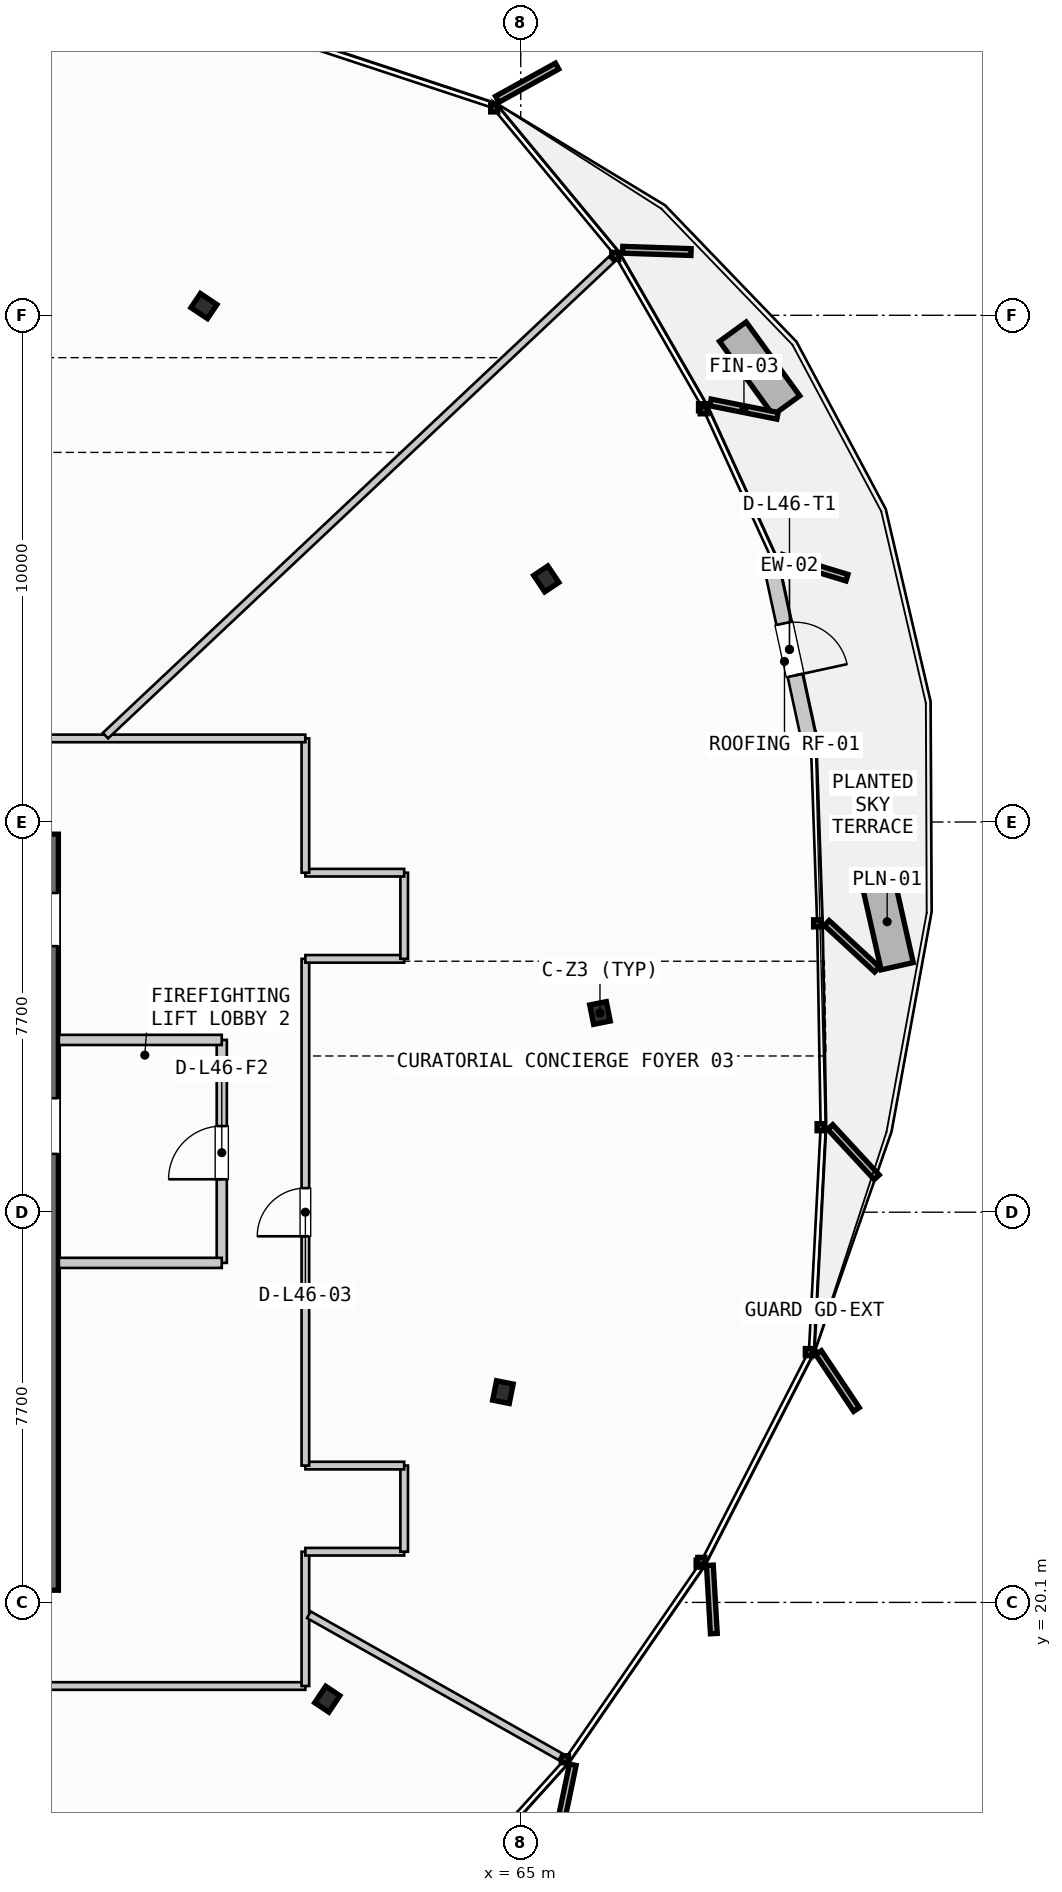
"""IFC4 building model, lengths in metres.
Left out: names, types, materials, properties, quantities, classifications, styles, units other than length and angle.
Written with IfcOpenShell. Run it as: python <this file> out.ifc"""

import sys

from ifc_helpers import new_model, si_unit, direction, frame, frame_2d, origin, origin_2d, place, context, subcontext, project, spatial, rectangle, i_section, extrude, source, transform, mapped, element, fill, save


model = new_model("IFC4")
c1 = context("Model", 3, precision=1e-05, world=origin(), true_north=direction((0.0, 1.0)))
c2 = subcontext(c1, "Body", "Model", "MODEL_VIEW")
j1 = project(units=[si_unit("LENGTHUNIT", "METRE"), si_unit("PLANEANGLEUNIT", "RADIAN")], contexts=[c1])
p1 = place(None, origin())
s1 = spatial("IfcSite", under=j1, at=p1, CompositionType="ELEMENT")
p2 = place(p1, origin())
s2 = spatial("IfcBuilding", under=s1, at=p2, CompositionType="ELEMENT")
p3 = place(p2, frame((0.0, 0.0, 179.9)))
s3 = spatial("IfcBuildingStorey", under=s2, at=p3, CompositionType="ELEMENT", Elevation=179.9)
p4 = place(p3, frame((55.6, 20.34, 0.0), z_axis=(0.0, 0.0, 1.0), x_axis=(0.0, 1.0, 0.0)))
e1 = element("IfcWall", 1, at=p4, inside=s3, PredefinedType="SHEAR", context=c2, shape_type="SweptSolid", body=[
    extrude(rectangle(XDim=14.92, YDim=0.55, at=frame_2d((7.46, 0.0))), origin(), (0.0, 0.0, 1.0), 3.26),
])
p5 = place(p4, frame((12.71, 0.0, 0.0)))
e2 = element("IfcOpeningElement", 2, at=p5, cuts=e1, PredefinedType="OPENING", context=c2, shape_type="SweptSolid", body=[
    extrude(rectangle(XDim=1.05, YDim=2.15, at=frame_2d((0.525, 1.075))), frame((0.0, 0.285, 0.0), z_axis=(0.0, -1.0, 0.0), x_axis=(1.0, 0.0, 0.0)), (0.0, 0.0, 1.0), 0.57),
])
p6 = place(p4, frame((8.61, 0.0, 0.0)))
e3 = element("IfcOpeningElement", 3, at=p6, cuts=e1, PredefinedType="OPENING", context=c2, shape_type="SweptSolid", body=[
    extrude(rectangle(XDim=1.1, YDim=2.2, at=frame_2d((0.55, 1.1))), frame((0.0, 0.285, 0.0), z_axis=(0.0, -1.0, 0.0), x_axis=(1.0, 0.0, 0.0)), (0.0, 0.0, 1.0), 0.57),
])
m1 = source(origin(), c2, "Body", "SweptSolid", [
    extrude(i_section(OverallWidth=0.391, OverallDepth=0.335, WebThickness=0.023, FlangeThickness=0.034, FilletRadius=0.015, at=origin_2d()), origin(), (0.0, 0.0, 1.0), 3.26),
])
for number, where, z_axis, x_axis in (
    (4, (66.564, 31.731, 0.0), (0.0, 0.0, 1.0), (0.981, 0.195, 0.0)),
    (5, (65.504, 40.298, 0.0), (0.0, 0.0, 1.0), (0.831, 0.556, 0.0)),
    (6, (58.748, 45.681, 0.0), (0.0, 0.0, 1.0), (0.556, 0.831, 0.0)),
    (7, (61.183, 18.19, 0.0), (0.0, 0.0, 1.0), (0.831, -0.556, 0.0)),
    (8, (64.649, 24.25, 0.0), (0.0, 0.0, 1.0), (0.981, -0.195, 0.0)),
):
    element("IfcColumn", number, at=place(p3, frame(where, z_axis=z_axis, x_axis=x_axis)), inside=s3, PredefinedType="COLUMN", context=c2, shape_type="MappedRepresentation", body=[
        mapped(m1, transform((0.0, 0.0, 0.0), scale=1.0)),
    ])
p7 = place(p3, frame((69.935, 40.613, 0.0), z_axis=(0.0, 0.0, 1.0), x_axis=(0.211576423472, -0.977361456694, 0.0)))
e9 = element("IfcWall", 9, at=p7, inside=s3, PredefinedType="SOLIDWALL", context=c2, shape_type="SweptSolid", body=[
    extrude(rectangle(XDim=3.493, YDim=0.3, at=frame_2d((1.747, 0.0))), origin(), (0.0, 0.0, 1.0), 2.735),
])
p8 = place(p7, frame((1.221, 0.0, 0.0)))
e10 = element("IfcOpeningElement", 10, at=p8, cuts=e9, PredefinedType="OPENING", context=c2, shape_type="SweptSolid", body=[
    extrude(rectangle(XDim=1.05, YDim=2.2, at=frame_2d((0.525, 1.1))), frame((0.0, 0.16, 0.0), z_axis=(0.0, -1.0, 0.0), x_axis=(1.0, 0.0, 0.0)), (0.0, 0.0, 1.0), 0.32),
])
p9 = place(p3, frame((59.1, 26.8, 0.0), z_axis=(0.0, 0.0, 1.0), x_axis=(0.0, 1.0, 0.0)))
e11 = element("IfcWall", 11, at=p9, inside=s3, PredefinedType="PARTITIONING", context=c2, shape_type="SweptSolid", body=[
    extrude(rectangle(XDim=4.4, YDim=0.2, at=frame_2d((2.2, 0.0))), origin(), (0.0, 0.0, 1.0), 2.28),
])
p10 = place(p9, frame((1.65, 0.0, 0.0)))
e12 = element("IfcOpeningElement", 12, at=p10, cuts=e11, PredefinedType="OPENING", context=c2, shape_type="SweptSolid", body=[
    extrude(rectangle(XDim=1.05, YDim=2.15, at=frame_2d((0.525, 1.075))), frame((0.0, 0.11, 0.0), z_axis=(0.0, -1.0, 0.0), x_axis=(1.0, 0.0, 0.0)), (0.0, 0.0, 1.0), 0.22),
])
for number, where, z_axis, x_axis in (
    (13, (55.885, 26.8, 0.0), (0.0, 0.0, 1.0), (1.0, 0.0, 0.0)),
    (14, (55.885, 31.2, 0.0), (0.0, 0.0, 1.0), (1.0, 0.0, 0.0)),
):
    element("IfcWall", number, at=place(p3, frame(where, z_axis=z_axis, x_axis=x_axis)), inside=s3, PredefinedType="PARTITIONING", context=c2, shape_type="SweptSolid", body=[
        extrude(rectangle(XDim=3.215, YDim=0.2, at=frame_2d((1.607, 0.0))), origin(), (0.0, 0.0, 1.0), 2.28),
    ])
p11 = place(p3, frame((32.4, 18.45, 0.0), z_axis=(0.0, 0.0, 1.0), x_axis=(1.0, 0.0, 0.0)))
e15 = element("IfcWall", 15, at=p11, inside=s3, PredefinedType="PARTITIONING", context=c2, shape_type="SweptSolid", body=[
    extrude(rectangle(XDim=28.35, YDim=0.15, at=frame_2d((14.175, 0.0))), origin(), (0.0, 0.0, 1.0), 2.28),
])
p12 = place(p11, frame((5.362, 0.0, 0.0)))
e16 = element("IfcOpeningElement", 16, at=p12, cuts=e15, PredefinedType="OPENING", context=c2, shape_type="SweptSolid", body=[
    extrude(rectangle(XDim=0.95, YDim=2.15, at=frame_2d((0.475, 1.075))), frame((0.0, 0.085, 0.0), z_axis=(0.0, -1.0, 0.0), x_axis=(1.0, 0.0, 0.0)), (0.0, 0.0, 1.0), 0.17),
])
p13 = place(p11, frame((18.948, 0.0, 0.0)))
e17 = element("IfcOpeningElement", 17, at=p13, cuts=e15, PredefinedType="OPENING", context=c2, shape_type="SweptSolid", body=[
    extrude(rectangle(XDim=0.95, YDim=2.15, at=frame_2d((0.475, 1.075))), frame((0.0, 0.085, 0.0), z_axis=(0.0, -1.0, 0.0), x_axis=(1.0, 0.0, 0.0)), (0.0, 0.0, 1.0), 0.17),
])
p14 = place(p3, frame((60.75, 18.45, 0.0), z_axis=(0.0, 0.0, 1.0), x_axis=(0.0, 1.0, 0.0)))
e18 = element("IfcWall", 18, at=p14, inside=s3, PredefinedType="PARTITIONING", context=c2, shape_type="SweptSolid", body=[
    extrude(rectangle(XDim=2.65, YDim=0.15, at=frame_2d((1.325, 0.0))), origin(), (0.0, 0.0, 1.0), 2.28),
])
p15 = place(p3, frame((60.75, 21.1, 0.0), z_axis=(0.0, 0.0, 1.0), x_axis=(1.0, 0.0, 0.0)))
e19 = element("IfcWall", 19, at=p15, inside=s3, PredefinedType="PARTITIONING", context=c2, shape_type="SweptSolid", body=[
    extrude(rectangle(XDim=1.95, YDim=0.15, at=frame_2d((0.975, 0.0))), origin(), (0.0, 0.0, 1.0), 2.28),
])
p16 = place(p3, frame((62.7, 21.1, 0.0), z_axis=(0.0, 0.0, 1.0), x_axis=(0.0, 1.0, 0.0)))
e20 = element("IfcWall", 20, at=p16, inside=s3, PredefinedType="PARTITIONING", context=c2, shape_type="SweptSolid", body=[
    extrude(rectangle(XDim=1.7, YDim=0.15, at=frame_2d((0.85, 0.0))), origin(), (0.0, 0.0, 1.0), 2.28),
])
p17 = place(p3, frame((62.7, 22.8, 0.0), z_axis=(0.0, 0.0, 1.0), x_axis=(-1.0, 0.0, 0.0)))
e21 = element("IfcWall", 21, at=p17, inside=s3, PredefinedType="PARTITIONING", context=c2, shape_type="SweptSolid", body=[
    extrude(rectangle(XDim=1.95, YDim=0.15, at=frame_2d((0.975, 0.0))), origin(), (0.0, 0.0, 1.0), 2.28),
])
p18 = place(p3, frame((60.75, 22.8, 0.0), z_axis=(0.0, 0.0, 1.0), x_axis=(0.0, 1.0, 0.0)))
e22 = element("IfcWall", 22, at=p18, inside=s3, PredefinedType="PARTITIONING", context=c2, shape_type="SweptSolid", body=[
    extrude(rectangle(XDim=10.0, YDim=0.15, at=frame_2d((5.0, 0.0))), origin(), (0.0, 0.0, 1.0), 2.28),
])
p19 = place(p18, frame((4.525, 0.0, 0.0)))
e23 = element("IfcOpeningElement", 23, at=p19, cuts=e22, PredefinedType="OPENING", context=c2, shape_type="SweptSolid", body=[
    extrude(rectangle(XDim=0.95, YDim=2.15, at=frame_2d((0.475, 1.075))), frame((0.0, 0.085, 0.0), z_axis=(0.0, -1.0, 0.0), x_axis=(1.0, 0.0, 0.0)), (0.0, 0.0, 1.0), 0.17),
])
p20 = place(p3, frame((60.75, 32.8, 0.0), z_axis=(0.0, 0.0, 1.0), x_axis=(1.0, 0.0, 0.0)))
e24 = element("IfcWall", 24, at=p20, inside=s3, PredefinedType="PARTITIONING", context=c2, shape_type="SweptSolid", body=[
    extrude(rectangle(XDim=1.95, YDim=0.15, at=frame_2d((0.975, 0.0))), origin(), (0.0, 0.0, 1.0), 2.28),
])
p21 = place(p3, frame((62.7, 32.8, 0.0), z_axis=(0.0, 0.0, 1.0), x_axis=(0.0, 1.0, 0.0)))
e25 = element("IfcWall", 25, at=p21, inside=s3, PredefinedType="PARTITIONING", context=c2, shape_type="SweptSolid", body=[
    extrude(rectangle(XDim=1.7, YDim=0.15, at=frame_2d((0.85, 0.0))), origin(), (0.0, 0.0, 1.0), 2.28),
])
p22 = place(p3, frame((62.7, 34.5, 0.0), z_axis=(0.0, 0.0, 1.0), x_axis=(-1.0, 0.0, 0.0)))
e26 = element("IfcWall", 26, at=p22, inside=s3, PredefinedType="PARTITIONING", context=c2, shape_type="SweptSolid", body=[
    extrude(rectangle(XDim=1.95, YDim=0.15, at=frame_2d((0.975, 0.0))), origin(), (0.0, 0.0, 1.0), 2.28),
])
p23 = place(p3, frame((60.75, 34.5, 0.0), z_axis=(0.0, 0.0, 1.0), x_axis=(0.0, 1.0, 0.0)))
e27 = element("IfcWall", 27, at=p23, inside=s3, PredefinedType="PARTITIONING", context=c2, shape_type="SweptSolid", body=[
    extrude(rectangle(XDim=2.65, YDim=0.15, at=frame_2d((1.325, 0.0))), origin(), (0.0, 0.0, 1.0), 2.28),
])
p24 = place(p3, frame((60.75, 37.15, 0.0), z_axis=(0.0, 0.0, 1.0), x_axis=(-1.0, 0.0, 0.0)))
e28 = element("IfcWall", 28, at=p24, inside=s3, PredefinedType="PARTITIONING", context=c2, shape_type="SweptSolid", body=[
    extrude(rectangle(XDim=28.35, YDim=0.15, at=frame_2d((14.175, 0.0))), origin(), (0.0, 0.0, 1.0), 2.28),
])
p25 = place(p24, frame((15.347, 0.0, 0.0)))
e29 = element("IfcOpeningElement", 29, at=p25, cuts=e28, PredefinedType="OPENING", context=c2, shape_type="SweptSolid", body=[
    extrude(rectangle(XDim=0.95, YDim=2.15, at=frame_2d((0.475, 1.075))), frame((0.0, 0.085, 0.0), z_axis=(0.0, -1.0, 0.0), x_axis=(1.0, 0.0, 0.0)), (0.0, 0.0, 1.0), 0.17),
])
p26 = place(p3, frame((60.82, 19.856, 0.0), z_axis=(0.0, 0.0, 1.0), x_axis=(0.870840276809, -0.491566081303, 0.0)))
e30 = element("IfcWall", 30, at=p26, inside=s3, PredefinedType="PARTITIONING", context=c2, shape_type="SweptSolid", body=[
    extrude(rectangle(XDim=5.701, YDim=0.15, at=frame_2d((2.85, 0.0))), origin(), (0.0, 0.0, 1.0), 2.28),
])
p27 = place(p3, frame((56.805, 37.205, 0.0), z_axis=(0.0, 0.0, 1.0), x_axis=(0.728284128677, 0.685275293526, 0.0)))
e31 = element("IfcWall", 31, at=p27, inside=s3, PredefinedType="PARTITIONING", context=c2, shape_type="SweptSolid", body=[
    extrude(rectangle(XDim=13.715, YDim=0.15, at=frame_2d((6.857, 0.0))), origin(), (0.0, 0.0, 1.0), 2.28),
])
m2 = source(origin(), c2, "Body", "SweptSolid", [
    extrude(rectangle(XDim=1.05, YDim=2.2, at=frame_2d((0.525, 1.1))), frame((0.0, 0.025, 0.0), z_axis=(0.0, -1.0, 0.0), x_axis=(1.0, 0.0, 0.0)), (0.0, 0.0, 1.0), 0.05),
])
p28 = place(p8, origin())
e32 = element("IfcDoor", 32, at=p28, inside=s3, OperationType="SINGLE_SWING_RIGHT", PredefinedType="DOOR", context=c2, shape_type="MappedRepresentation", body=[
    mapped(m2, transform((0.0, 0.0, 0.0), scale=1.0)),
])
fill(e10, e32)
m3 = source(origin(), c2, "Body", "SweptSolid", [
    extrude(rectangle(XDim=1.05, YDim=2.15, at=frame_2d((0.525, 1.075))), frame((0.0, 0.025, 0.0), z_axis=(0.0, -1.0, 0.0), x_axis=(1.0, 0.0, 0.0)), (0.0, 0.0, 1.0), 0.05),
])
p29 = place(p10, origin())
e33 = element("IfcDoor", 33, at=p29, inside=s3, OperationType="SINGLE_SWING_LEFT", PredefinedType="DOOR", context=c2, shape_type="MappedRepresentation", body=[
    mapped(m3, transform((0.0, 0.0, 0.0), scale=1.0)),
])
fill(e12, e33)
m4 = source(origin(), c2, "Body", "SweptSolid", [
    extrude(rectangle(XDim=0.95, YDim=2.15, at=frame_2d((0.475, 1.075))), frame((0.0, 0.025, 0.0), z_axis=(0.0, -1.0, 0.0), x_axis=(1.0, 0.0, 0.0)), (0.0, 0.0, 1.0), 0.05),
])
p30 = place(p19, origin())
e34 = element("IfcDoor", 34, at=p30, inside=s3, OperationType="SINGLE_SWING_LEFT", PredefinedType="DOOR", context=c2, shape_type="MappedRepresentation", body=[
    mapped(m4, transform((0.0, 0.0, 0.0), scale=1.0)),
])
fill(e23, e34)
save(model, sys.argv[1])
